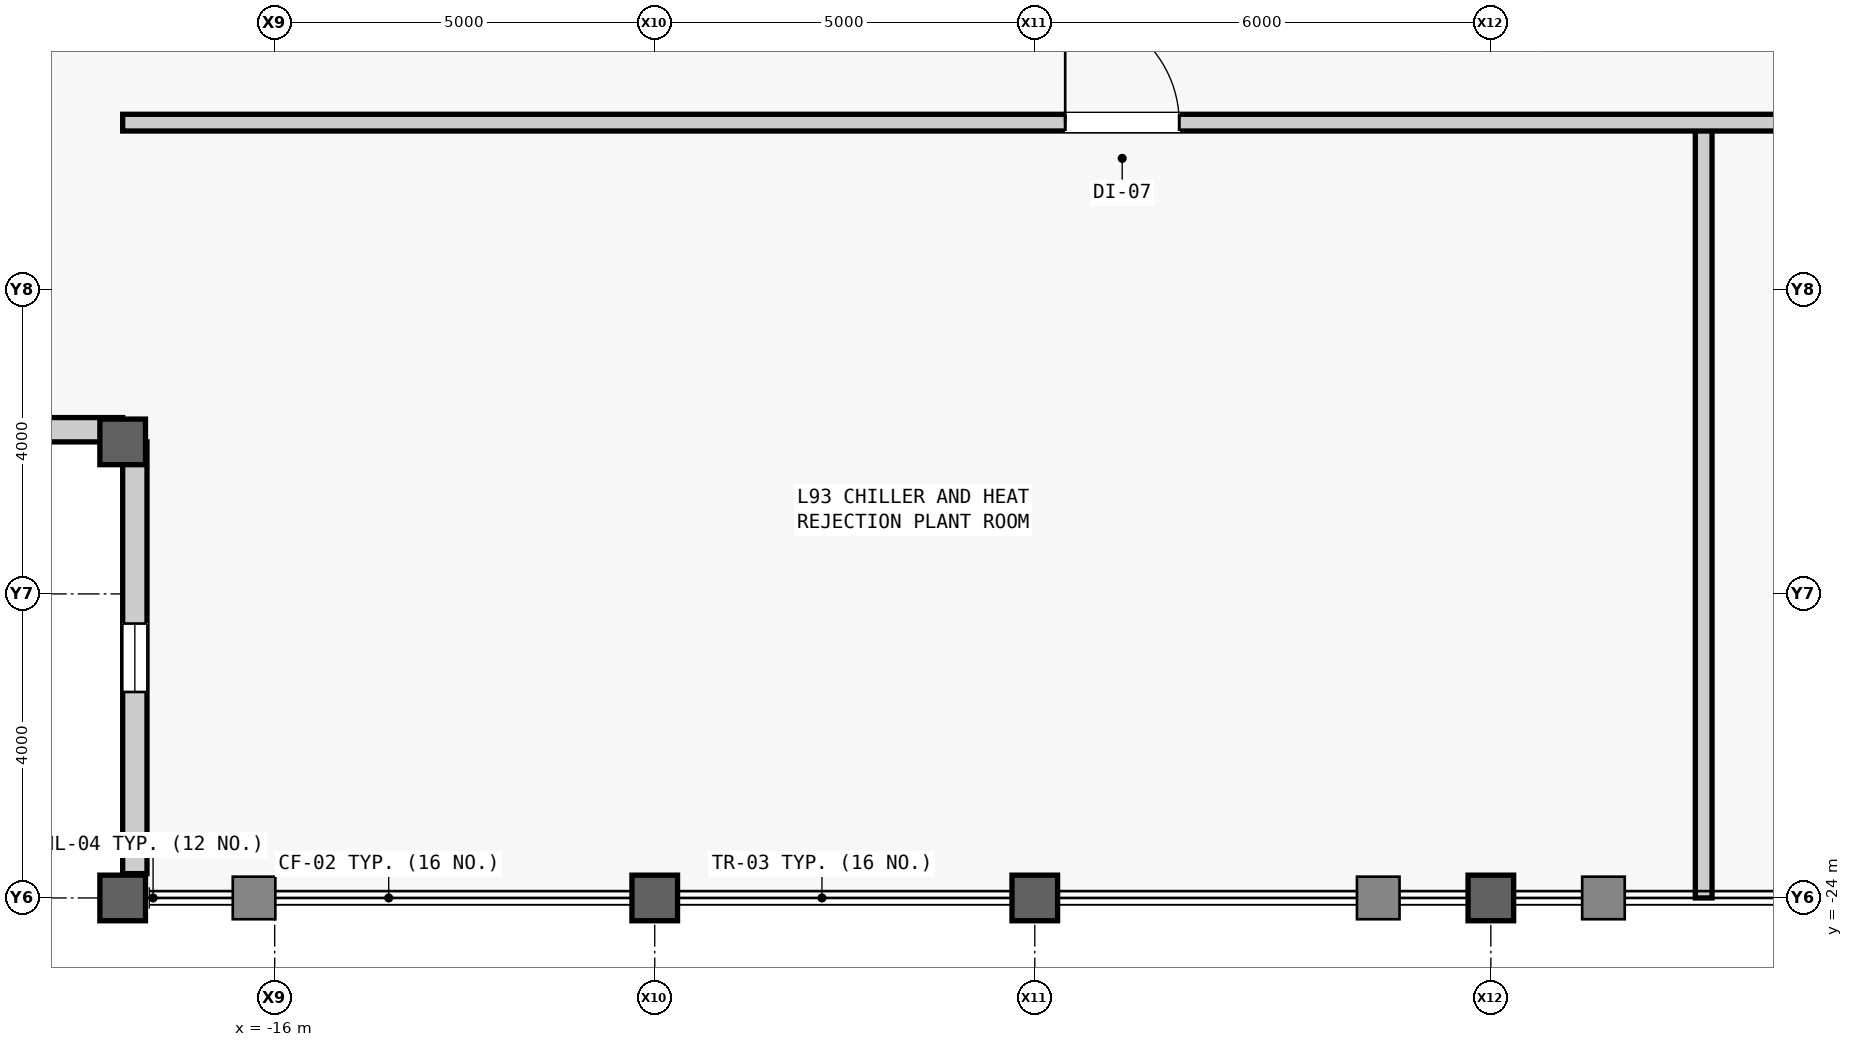
"""IFC4 building model, lengths in metres.
Left out: names, types, materials, properties, quantities, classifications, styles, units other than length and angle.
Written with IfcOpenShell. Run it as: python <this file> out.ifc"""

import sys

from ifc_helpers import new_model, si_unit, direction, frame, frame_2d, origin, origin_2d, place, context, subcontext, project, spatial, rectangle, hollow_rectangle, extrude, source, transform, mapped, element, fill, save


model = new_model("IFC4")
c1 = context("Model", 3, precision=1e-05, world=origin(), true_north=direction((0.0, 1.0)))
c2 = subcontext(c1, "Body", "Model", "MODEL_VIEW")
j1 = project(units=[si_unit("LENGTHUNIT", "METRE"), si_unit("PLANEANGLEUNIT", "RADIAN")], contexts=[c1])
p1 = place(None, origin())
s1 = spatial("IfcSite", under=j1, at=p1, CompositionType="ELEMENT")
p2 = place(p1, origin())
s2 = spatial("IfcBuilding", under=s1, at=p2, CompositionType="ELEMENT")
p3 = place(p2, frame((0.0, 0.0, 394.7)))
s3 = spatial("IfcBuildingStorey", under=s2, at=p3, CompositionType="ELEMENT", Elevation=394.7)
m1 = source(origin(), c2, "Body", "SweptSolid", [
    extrude(hollow_rectangle(XDim=0.6, YDim=0.6, WallThickness=0.035, at=origin_2d()), origin(), (0.0, 0.0, 1.0), 4.8),
])
for number, where, z_axis, x_axis in (
    (1, (-18.0, -24.0, 0.0), (0.0, 0.0, 1.0), (1.0, 0.0, 0.0)),
    (2, (-18.0, -18.0, 0.0), (0.0, 0.0, 1.0), (1.0, 0.0, 0.0)),
    (3, (-11.0, -24.0, 0.0), (0.0, 0.0, 1.0), (1.0, 0.0, 0.0)),
    (4, (-6.0, -24.0, 0.0), (0.0, 0.0, 1.0), (1.0, 0.0, 0.0)),
    (5, (0.0, -24.0, 0.0), (0.0, 0.0, 1.0), (1.0, 0.0, 0.0)),
):
    element("IfcColumn", number, at=place(p3, frame(where, z_axis=z_axis, x_axis=x_axis)), inside=s3, PredefinedType="COLUMN", context=c2, shape_type="MappedRepresentation", body=[
        mapped(m1, transform((0.0, 0.0, 0.0), scale=1.0)),
    ])
m2 = source(origin(), c2, "Body", "SweptSolid", [
    extrude(rectangle(XDim=5.68, YDim=0.32, at=frame_2d((2.84, 0.0))), origin(), (0.0, 0.0, 1.0), 3.901),
])
p4 = place(p3, frame((-18.0, -17.84, 0.0), z_axis=(0.0, 0.0, 1.0), x_axis=(-1.0, 0.0, 0.0)))
e6 = element("IfcWall", 6, at=p4, inside=s3, PredefinedType="STANDARD", context=c2, shape_type="MappedRepresentation", body=[
    mapped(m2, transform((0.0, 0.0, 0.0), scale=1.0)),
])
m3 = source(origin(), c2, "Body", "SweptSolid", [
    extrude(rectangle(XDim=0.9, YDim=2.4, at=frame_2d((0.45, 1.2))), frame((0.0, 0.17, 0.0), z_axis=(0.0, -1.0, 0.0), x_axis=(1.0, 0.0, 0.0)), (0.0, 0.0, 1.0), 0.34),
])
p5 = place(p4, frame((2.39, 0.0, 0.7)))
e7 = element("IfcOpeningElement", 7, at=p5, cuts=e6, PredefinedType="OPENING", context=c2, shape_type="MappedRepresentation", body=[
    mapped(m3, transform((0.0, 0.0, 0.0), scale=1.0)),
])
p6 = place(p3, frame((-17.84, -23.68, 0.0), z_axis=(0.0, 0.0, 1.0), x_axis=(0.0, 1.0, 0.0)))
e8 = element("IfcWall", 8, at=p6, inside=s3, PredefinedType="STANDARD", context=c2, shape_type="MappedRepresentation", body=[
    mapped(m2, transform((0.0, 0.0, 0.0), scale=1.0)),
])
p7 = place(p6, frame((2.39, 0.0, 0.7)))
e9 = element("IfcOpeningElement", 9, at=p7, cuts=e8, PredefinedType="OPENING", context=c2, shape_type="MappedRepresentation", body=[
    mapped(m3, transform((0.0, 0.0, 0.0), scale=1.0)),
])
m4 = source(origin(), c2, "Body", "SweptSolid", [
    extrude(rectangle(XDim=10.2, YDim=0.22, at=frame_2d((5.1, 0.0))), origin(), (0.0, 0.0, 1.0), 4.45),
])
p8 = place(p3, frame((2.8, -24.0, 0.0), z_axis=(0.0, 0.0, 1.0), x_axis=(0.0, 1.0, 0.0)))
e10 = element("IfcWall", 10, at=p8, inside=s3, PredefinedType="PARTITIONING", context=c2, shape_type="MappedRepresentation", body=[
    mapped(m4, transform((0.0, 0.0, 0.0), scale=1.0)),
])
m5 = source(origin(), c2, "Body", "SweptSolid", [
    extrude(rectangle(XDim=36.0, YDim=0.22, at=frame_2d((18.0, 0.0))), origin(), (0.0, 0.0, 1.0), 4.45),
])
p9 = place(p3, frame((-18.0, -13.8, 0.0), z_axis=(0.0, 0.0, 1.0), x_axis=(1.0, 0.0, 0.0)))
e11 = element("IfcWall", 11, at=p9, inside=s3, PredefinedType="PARTITIONING", context=c2, shape_type="MappedRepresentation", body=[
    mapped(m5, transform((0.0, 0.0, 0.0), scale=1.0)),
])
m6 = source(origin(), c2, "Body", "SweptSolid", [
    extrude(rectangle(XDim=1.5, YDim=2.3, at=frame_2d((0.75, 1.15))), frame((0.0, 0.12, 0.0), z_axis=(0.0, -1.0, 0.0), x_axis=(1.0, 0.0, 0.0)), (0.0, 0.0, 1.0), 0.24),
])
p10 = place(p9, frame((12.4, 0.0, 0.0)))
e12 = element("IfcOpeningElement", 12, at=p10, cuts=e11, PredefinedType="OPENING", context=c2, shape_type="MappedRepresentation", body=[
    mapped(m6, transform((0.0, 0.0, 0.0), scale=1.0)),
])
p11 = place(p9, frame((25.4, 0.0, 0.0)))
e13 = element("IfcOpeningElement", 13, at=p11, cuts=e11, PredefinedType="OPENING", context=c2, shape_type="MappedRepresentation", body=[
    mapped(m6, transform((0.0, 0.0, 0.0), scale=1.0)),
])
m7 = source(origin(), c2, "Body", "SweptSolid", [
    extrude(rectangle(XDim=0.9, YDim=2.4, at=frame_2d((0.45, 1.2))), frame((0.0, 0.03, 0.0), z_axis=(0.0, -1.0, 0.0), x_axis=(1.0, 0.0, 0.0)), (0.0, 0.0, 1.0), 0.06),
])
p12 = place(p7, origin())
e14 = element("IfcWindow", 14, at=p12, inside=s3, PartitioningType="SINGLE_PANEL", PredefinedType="WINDOW", context=c2, shape_type="MappedRepresentation", body=[
    mapped(m7, transform((0.0, 0.0, 0.0), scale=1.0)),
])
fill(e9, e14)
m8 = source(origin(), c2, "Body", "SweptSolid", [
    extrude(rectangle(XDim=1.5, YDim=2.3, at=frame_2d((0.75, 1.15))), frame((0.0, 0.025, 0.0), z_axis=(0.0, -1.0, 0.0), x_axis=(1.0, 0.0, 0.0)), (0.0, 0.0, 1.0), 0.05),
])
p13 = place(p10, origin())
e15 = element("IfcDoor", 15, at=p13, inside=s3, OperationType="SINGLE_SWING_LEFT", PredefinedType="DOOR", context=c2, shape_type="MappedRepresentation", body=[
    mapped(m8, transform((0.0, 0.0, 0.0), scale=1.0)),
])
fill(e12, e15)
save(model, sys.argv[1])
